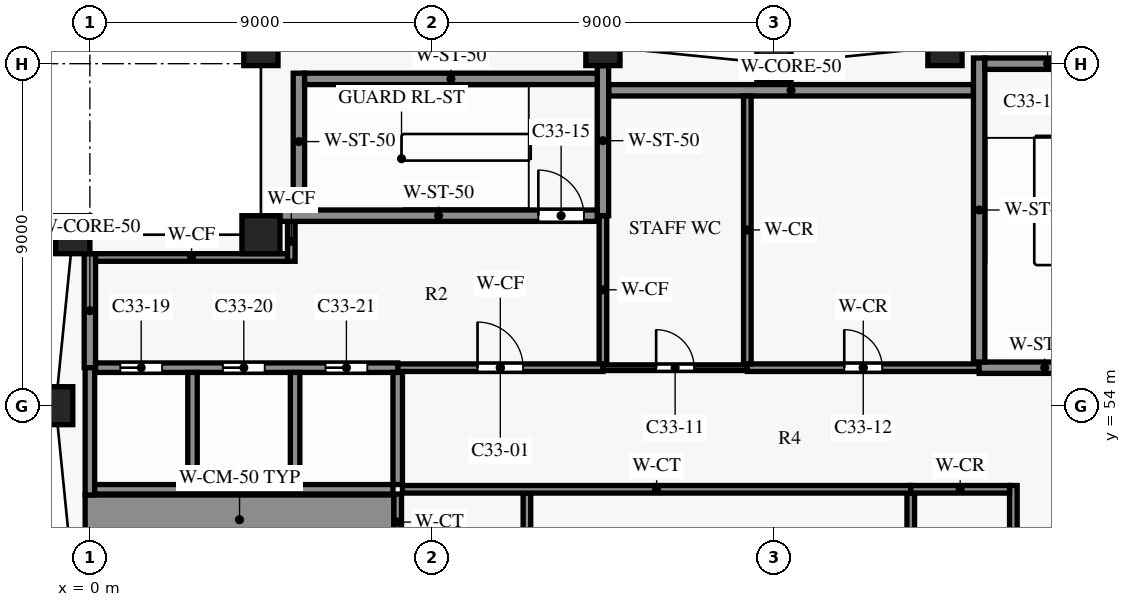
"""IFC4 building model, lengths in metres.
Left out: names, types, materials, properties, quantities, classifications, styles, units other than length and angle.
Written with IfcOpenShell. Run it as: python <this file> out.ifc"""

import sys

from ifc_helpers import new_model, si_unit, direction, frame, frame_2d, origin, origin_2d, place, context, subcontext, project, spatial, rectangle, extrude, element, fill, save


model = new_model("IFC4")
c1 = context("Model", 3, precision=1e-05, world=origin(), true_north=direction((0.0, 1.0)))
c2 = subcontext(c1, "Body", "Model", "MODEL_VIEW")
j1 = project(units=[si_unit("LENGTHUNIT", "METRE"), si_unit("PLANEANGLEUNIT", "RADIAN")], contexts=[c1])
p1 = place(None, origin())
s1 = spatial("IfcSite", under=j1, at=p1, CompositionType="ELEMENT")
p2 = place(p1, origin())
s2 = spatial("IfcBuilding", under=s1, at=p2, CompositionType="ELEMENT")
p3 = place(p2, frame((0.0, 0.0, 248.2)))
s3 = spatial("IfcBuildingStorey", under=s2, at=p3, CompositionType="ELEMENT", Elevation=248.2)
for number, where, z_axis, x_axis in (
    (1, (22.5, 63.45, 0.0), (0.0, 0.0, 1.0), (-0.995, -0.1, 0.0)),
    (2, (18.0, 63.0, 0.0), (0.0, 0.0, 1.0), (-1.0, 0.0, 0.0)),
    (3, (13.5, 63.45, 0.0), (0.0, 0.0, 1.0), (-0.995, 0.1, 0.0)),
    (4, (4.5, 63.45, 0.0), (0.0, 0.0, 1.0), (-0.995, -0.1, 0.0)),
    (5, (-0.45, 58.5, 0.0), (0.0, 0.0, 1.0), (-0.1, -0.995, 0.0)),
    (6, (-0.9, 54.0, 0.0), (0.0, 0.0, 1.0), (0.0, -1.0, 0.0)),
):
    element("IfcColumn", number, at=place(p3, frame(where, z_axis=z_axis, x_axis=x_axis)), inside=s3, PredefinedType="COLUMN", context=c2, shape_type="SweptSolid", body=[
        extrude(rectangle(XDim=0.9, YDim=1.0, at=origin_2d()), origin(), (0.0, 0.0, 1.0), 4.2),
    ])
p4 = place(p3, frame((4.5, 58.5, 0.0), z_axis=(0.0, 0.0, 1.0), x_axis=(1.0, 0.0, 0.0)))
e7 = element("IfcColumn", 7, at=p4, inside=s3, PredefinedType="COLUMN", context=c2, shape_type="SweptSolid", body=[
    extrude(rectangle(XDim=1.0, YDim=1.0, at=origin_2d()), origin(), (0.0, 0.0, 1.0), 4.2),
])
p5 = place(p3, frame((-0.125, 51.0, 0.0), z_axis=(0.0, 0.0, 1.0), x_axis=(1.0, 0.0, 0.0)))
e8 = element("IfcWall", 8, at=p5, inside=s3, PredefinedType="SHEAR", context=c2, shape_type="SweptSolid", body=[
    extrude(rectangle(XDim=8.125, YDim=1.3, at=frame_2d((4.062, 0.0))), origin(), (0.0, 0.0, 1.0), 3.9),
])
p6 = place(p3, frame((8.225, 51.8, 0.0), z_axis=(0.0, 0.0, 1.0), x_axis=(1.0, 0.0, 0.0)))
e9 = element("IfcWall", 9, at=p6, inside=s3, PredefinedType="PARTITIONING", context=c2, shape_type="SweptSolid", body=[
    extrude(rectangle(XDim=13.375, YDim=0.2, at=frame_2d((6.688, 0.0))), origin(), (0.0, 0.0, 1.0), 3.9),
])
p7 = place(p3, frame((21.6, 51.8, 0.0), z_axis=(0.0, 0.0, 1.0), x_axis=(1.0, 0.0, 0.0)))
e10 = element("IfcWall", 10, at=p7, inside=s3, PredefinedType="PARTITIONING", context=c2, shape_type="SweptSolid", body=[
    extrude(rectangle(XDim=2.6, YDim=0.2, at=frame_2d((1.3, 0.0))), origin(), (0.0, 0.0, 1.0), 3.9),
])
p8 = place(p3, frame((0.125, 51.8, 0.0), z_axis=(0.0, 0.0, 1.0), x_axis=(1.0, 0.0, 0.0)))
e11 = element("IfcWall", 11, at=p8, inside=s3, PredefinedType="SHEAR", context=c2, shape_type="SweptSolid", body=[
    extrude(rectangle(XDim=7.85, YDim=0.25, at=frame_2d((3.925, 0.0))), origin(), (0.0, 0.0, 1.0), 3.9),
])
p9 = place(p3, frame((8.1, 55.0, 0.0), z_axis=(0.0, 0.0, 1.0), x_axis=(1.0, 0.0, 0.0)))
e12 = element("IfcWall", 12, at=p9, inside=s3, PredefinedType="PARTITIONING", context=c2, shape_type="SweptSolid", body=[
    extrude(rectangle(XDim=5.4, YDim=0.2, at=frame_2d((2.7, 0.0))), origin(), (0.0, 0.0, 1.0), 3.9),
])
p10 = place(p9, frame((2.1, 0.0, 0.0)))
e13 = element("IfcOpeningElement", 13, at=p10, cuts=e12, PredefinedType="OPENING", context=c2, shape_type="SweptSolid", body=[
    extrude(rectangle(XDim=1.2, YDim=2.2, at=frame_2d((0.6, 1.1))), frame((0.0, 0.11, 0.0), z_axis=(0.0, -1.0, 0.0), x_axis=(1.0, 0.0, 0.0)), (0.0, 0.0, 1.0), 0.22),
])
p11 = place(p3, frame((13.5, 55.0, 0.0), z_axis=(0.0, 0.0, 1.0), x_axis=(1.0, 0.0, 0.0)))
e14 = element("IfcWall", 14, at=p11, inside=s3, PredefinedType="PARTITIONING", context=c2, shape_type="SweptSolid", body=[
    extrude(rectangle(XDim=3.8, YDim=0.15, at=frame_2d((1.9, 0.0))), origin(), (0.0, 0.0, 1.0), 3.9),
])
p12 = place(p11, frame((1.4, 0.0, 0.0)))
e15 = element("IfcOpeningElement", 15, at=p12, cuts=e14, PredefinedType="OPENING", context=c2, shape_type="SweptSolid", body=[
    extrude(rectangle(XDim=1.0, YDim=2.1, at=frame_2d((0.5, 1.05))), frame((0.0, 0.085, 0.0), z_axis=(0.0, -1.0, 0.0), x_axis=(1.0, 0.0, 0.0)), (0.0, 0.0, 1.0), 0.17),
])
p13 = place(p3, frame((17.3, 55.0, 0.0), z_axis=(0.0, 0.0, 1.0), x_axis=(1.0, 0.0, 0.0)))
e16 = element("IfcWall", 16, at=p13, inside=s3, PredefinedType="PARTITIONING", context=c2, shape_type="SweptSolid", body=[
    extrude(rectangle(XDim=6.1, YDim=0.2, at=frame_2d((3.05, 0.0))), origin(), (0.0, 0.0, 1.0), 3.9),
])
p14 = place(p13, frame((2.55, 0.0, 0.0)))
e17 = element("IfcOpeningElement", 17, at=p14, cuts=e16, PredefinedType="OPENING", context=c2, shape_type="SweptSolid", body=[
    extrude(rectangle(XDim=1.0, YDim=2.1, at=frame_2d((0.5, 1.05))), frame((0.0, 0.11, 0.0), z_axis=(0.0, -1.0, 0.0), x_axis=(1.0, 0.0, 0.0)), (0.0, 0.0, 1.0), 0.22),
])
p15 = place(p3, frame((0.15, 55.0, 0.0), z_axis=(0.0, 0.0, 1.0), x_axis=(1.0, 0.0, 0.0)))
e18 = element("IfcWall", 18, at=p15, inside=s3, PredefinedType="SHEAR", context=c2, shape_type="SweptSolid", body=[
    extrude(rectangle(XDim=7.95, YDim=0.25, at=frame_2d((3.975, 0.0))), origin(), (0.0, 0.0, 1.0), 3.9),
])
p16 = place(p15, frame((0.65, 0.0, 0.0)))
e19 = element("IfcOpeningElement", 19, at=p16, cuts=e18, PredefinedType="OPENING", context=c2, shape_type="SweptSolid", body=[
    extrude(rectangle(XDim=1.1, YDim=2.1, at=frame_2d((0.55, 1.05))), frame((0.0, 0.135, 0.0), z_axis=(0.0, -1.0, 0.0), x_axis=(1.0, 0.0, 0.0)), (0.0, 0.0, 1.0), 0.27),
])
p17 = place(p15, frame((3.35, 0.0, 0.0)))
e20 = element("IfcOpeningElement", 20, at=p17, cuts=e18, PredefinedType="OPENING", context=c2, shape_type="SweptSolid", body=[
    extrude(rectangle(XDim=1.1, YDim=2.1, at=frame_2d((0.55, 1.05))), frame((0.0, 0.135, 0.0), z_axis=(0.0, -1.0, 0.0), x_axis=(1.0, 0.0, 0.0)), (0.0, 0.0, 1.0), 0.27),
])
p18 = place(p15, frame((6.05, 0.0, 0.0)))
e21 = element("IfcOpeningElement", 21, at=p18, cuts=e18, PredefinedType="OPENING", context=c2, shape_type="SweptSolid", body=[
    extrude(rectangle(XDim=1.1, YDim=2.1, at=frame_2d((0.55, 1.05))), frame((0.0, 0.135, 0.0), z_axis=(0.0, -1.0, 0.0), x_axis=(1.0, 0.0, 0.0)), (0.0, 0.0, 1.0), 0.27),
])
p19 = place(p3, frame((23.4, 55.0, 0.0), z_axis=(0.0, 0.0, 1.0), x_axis=(1.0, 0.0, 0.0)))
e22 = element("IfcWall", 22, at=p19, inside=s3, PredefinedType="SHEAR", context=c2, shape_type="SweptSolid", body=[
    extrude(rectangle(XDim=3.45, YDim=0.3, at=frame_2d((1.725, 0.0))), origin(), (0.0, 0.0, 1.0), 3.9),
])
p20 = place(p3, frame((0.15, 57.9, 0.0), z_axis=(0.0, 0.0, 1.0), x_axis=(1.0, 0.0, 0.0)))
e23 = element("IfcWall", 23, at=p20, inside=s3, PredefinedType="PARTITIONING", context=c2, shape_type="SweptSolid", body=[
    extrude(rectangle(XDim=5.05, YDim=0.2, at=frame_2d((2.525, 0.0))), origin(), (0.0, 0.0, 1.0), 3.9),
])
p21 = place(p3, frame((5.0, 59.0, 0.0), z_axis=(0.0, 0.0, 1.0), x_axis=(1.0, 0.0, 0.0)))
e24 = element("IfcWall", 24, at=p21, inside=s3, PredefinedType="SHEAR", context=c2, shape_type="SweptSolid", body=[
    extrude(rectangle(XDim=8.35, YDim=0.3, at=frame_2d((4.175, 0.0))), origin(), (0.0, 0.0, 1.0), 3.9),
])
p22 = place(p21, frame((6.8, 0.0, 0.0)))
e25 = element("IfcOpeningElement", 25, at=p22, cuts=e24, PredefinedType="OPENING", context=c2, shape_type="SweptSolid", body=[
    extrude(rectangle(XDim=1.2, YDim=2.2, at=frame_2d((0.6, 1.1))), frame((0.0, 0.16, 0.0), z_axis=(0.0, -1.0, 0.0), x_axis=(1.0, 0.0, 0.0)), (0.0, 0.0, 1.0), 0.32),
])
p23 = place(p3, frame((13.65, 62.3, 0.0), z_axis=(0.0, 0.0, 1.0), x_axis=(1.0, 0.0, 0.0)))
e26 = element("IfcWall", 26, at=p23, inside=s3, PredefinedType="SHEAR", context=c2, shape_type="SweptSolid", body=[
    extrude(rectangle(XDim=9.6, YDim=0.3, at=frame_2d((4.8, 0.0))), origin(), (0.0, 0.0, 1.0), 3.9),
])
p24 = place(p3, frame((5.65, 62.6, 0.0), z_axis=(0.0, 0.0, 1.0), x_axis=(1.0, 0.0, 0.0)))
e27 = element("IfcWall", 27, at=p24, inside=s3, PredefinedType="SHEAR", context=c2, shape_type="SweptSolid", body=[
    extrude(rectangle(XDim=7.7, YDim=0.3, at=frame_2d((3.85, 0.0))), origin(), (0.0, 0.0, 1.0), 3.9),
])
p25 = place(p3, frame((23.55, 63.0, 0.0), z_axis=(0.0, 0.0, 1.0), x_axis=(1.0, 0.0, 0.0)))
e28 = element("IfcWall", 28, at=p25, inside=s3, PredefinedType="SHEAR", context=c2, shape_type="SweptSolid", body=[
    extrude(rectangle(XDim=3.3, YDim=0.3, at=frame_2d((1.65, 0.0))), origin(), (0.0, 0.0, 1.0), 3.9),
])
p26 = place(p3, frame((0.0, 55.0, 0.0), z_axis=(0.0, 0.0, 1.0), x_axis=(0.0, 1.0, 0.0)))
e29 = element("IfcWall", 29, at=p26, inside=s3, PredefinedType="SHEAR", context=c2, shape_type="SweptSolid", body=[
    extrude(rectangle(XDim=3.0, YDim=0.3, at=frame_2d((1.5, 0.0))), origin(), (0.0, 0.0, 1.0), 3.9),
])
p27 = place(p3, frame((0.0, 51.65, 0.0), z_axis=(0.0, 0.0, 1.0), x_axis=(0.0, 1.0, 0.0)))
e30 = element("IfcWall", 30, at=p27, inside=s3, PredefinedType="SHEAR", context=c2, shape_type="SweptSolid", body=[
    extrude(rectangle(XDim=3.35, YDim=0.25, at=frame_2d((1.675, 0.0))), origin(), (0.0, 0.0, 1.0), 3.9),
])
p28 = place(p3, frame((2.7, 51.925, 0.0), z_axis=(0.0, 0.0, 1.0), x_axis=(0.0, 1.0, 0.0)))
e31 = element("IfcWall", 31, at=p28, inside=s3, PredefinedType="SHEAR", context=c2, shape_type="SweptSolid", body=[
    extrude(rectangle(XDim=2.95, YDim=0.25, at=frame_2d((1.475, 0.0))), origin(), (0.0, 0.0, 1.0), 3.9),
])
p29 = place(p3, frame((5.3, 57.8, 0.0), z_axis=(0.0, 0.0, 1.0), x_axis=(0.0, 1.0, 0.0)))
e32 = element("IfcWall", 32, at=p29, inside=s3, PredefinedType="PARTITIONING", context=c2, shape_type="SweptSolid", body=[
    extrude(rectangle(XDim=1.05, YDim=0.2, at=frame_2d((0.525, 0.0))), origin(), (0.0, 0.0, 1.0), 3.9),
])
p30 = place(p3, frame((5.4, 51.925, 0.0), z_axis=(0.0, 0.0, 1.0), x_axis=(0.0, 1.0, 0.0)))
e33 = element("IfcWall", 33, at=p30, inside=s3, PredefinedType="SHEAR", context=c2, shape_type="SweptSolid", body=[
    extrude(rectangle(XDim=2.95, YDim=0.25, at=frame_2d((1.475, 0.0))), origin(), (0.0, 0.0, 1.0), 3.9),
])
p31 = place(p3, frame((5.5, 59.15, 0.0), z_axis=(0.0, 0.0, 1.0), x_axis=(0.0, 1.0, 0.0)))
e34 = element("IfcWall", 34, at=p31, inside=s3, PredefinedType="SHEAR", context=c2, shape_type="SweptSolid", body=[
    extrude(rectangle(XDim=3.6, YDim=0.3, at=frame_2d((1.8, 0.0))), origin(), (0.0, 0.0, 1.0), 3.9),
])
p32 = place(p3, frame((8.1, 50.2, 0.0), z_axis=(0.0, 0.0, 1.0), x_axis=(0.0, 1.0, 0.0)))
e35 = element("IfcWall", 35, at=p32, inside=s3, PredefinedType="PARTITIONING", context=c2, shape_type="SweptSolid", body=[
    extrude(rectangle(XDim=1.475, YDim=0.2, at=frame_2d((0.738, 0.0))), origin(), (0.0, 0.0, 1.0), 3.9),
])
p33 = place(p3, frame((8.1, 51.925, 0.0), z_axis=(0.0, 0.0, 1.0), x_axis=(0.0, 1.0, 0.0)))
e36 = element("IfcWall", 36, at=p33, inside=s3, PredefinedType="SHEAR", context=c2, shape_type="SweptSolid", body=[
    extrude(rectangle(XDim=2.95, YDim=0.25, at=frame_2d((1.475, 0.0))), origin(), (0.0, 0.0, 1.0), 3.9),
])
p34 = place(p3, frame((11.5, 47.1, 0.0), z_axis=(0.0, 0.0, 1.0), x_axis=(0.0, 1.0, 0.0)))
e37 = element("IfcWall", 37, at=p34, inside=s3, PredefinedType="PARTITIONING", context=c2, shape_type="SweptSolid", body=[
    extrude(rectangle(XDim=4.6, YDim=0.2, at=frame_2d((2.3, 0.0))), origin(), (0.0, 0.0, 1.0), 3.9),
])
p35 = place(p3, frame((13.5, 55.1, 0.0), z_axis=(0.0, 0.0, 1.0), x_axis=(0.0, 1.0, 0.0)))
e38 = element("IfcWall", 38, at=p35, inside=s3, PredefinedType="PARTITIONING", context=c2, shape_type="SweptSolid", body=[
    extrude(rectangle(XDim=3.9, YDim=0.2, at=frame_2d((1.95, 0.0))), origin(), (0.0, 0.0, 1.0), 3.9),
])
p36 = place(p3, frame((13.5, 59.0, 0.0), z_axis=(0.0, 0.0, 1.0), x_axis=(0.0, 1.0, 0.0)))
e39 = element("IfcWall", 39, at=p36, inside=s3, PredefinedType="SHEAR", context=c2, shape_type="SweptSolid", body=[
    extrude(rectangle(XDim=3.948, YDim=0.3, at=frame_2d((1.974, 0.0))), origin(), (0.0, 0.0, 1.0), 3.9),
])
p37 = place(p3, frame((17.3, 55.1, 0.0), z_axis=(0.0, 0.0, 1.0), x_axis=(0.0, 1.0, 0.0)))
e40 = element("IfcWall", 40, at=p37, inside=s3, PredefinedType="PARTITIONING", context=c2, shape_type="SweptSolid", body=[
    extrude(rectangle(XDim=7.05, YDim=0.2, at=frame_2d((3.525, 0.0))), origin(), (0.0, 0.0, 1.0), 3.9),
])
p38 = place(p3, frame((21.6, 47.1, 0.0), z_axis=(0.0, 0.0, 1.0), x_axis=(0.0, 1.0, 0.0)))
e41 = element("IfcWall", 41, at=p38, inside=s3, PredefinedType="PARTITIONING", context=c2, shape_type="SweptSolid", body=[
    extrude(rectangle(XDim=4.6, YDim=0.2, at=frame_2d((2.3, 0.0))), origin(), (0.0, 0.0, 1.0), 3.9),
])
p39 = place(p3, frame((23.4, 55.15, 0.0), z_axis=(0.0, 0.0, 1.0), x_axis=(0.0, 1.0, 0.0)))
e42 = element("IfcWall", 42, at=p39, inside=s3, PredefinedType="SHEAR", context=c2, shape_type="SweptSolid", body=[
    extrude(rectangle(XDim=8.0, YDim=0.3, at=frame_2d((4.0, 0.0))), origin(), (0.0, 0.0, 1.0), 3.9),
])
p40 = place(p3, frame((24.3, 46.9, 0.0), z_axis=(0.0, 0.0, 1.0), x_axis=(0.0, 1.0, 0.0)))
e43 = element("IfcWall", 43, at=p40, inside=s3, PredefinedType="SHEAR", context=c2, shape_type="SweptSolid", body=[
    extrude(rectangle(XDim=5.0, YDim=0.2, at=frame_2d((2.5, 0.0))), origin(), (0.0, 0.0, 1.0), 3.9),
])
p41 = place(p10, origin())
e44 = element("IfcDoor", 44, at=p41, inside=s3, OperationType="SINGLE_SWING_RIGHT", PredefinedType="DOOR", context=c2, shape_type="SweptSolid", body=[
    extrude(rectangle(XDim=1.2, YDim=2.2, at=frame_2d((0.6, 1.1))), frame((0.0, 0.025, 0.0), z_axis=(0.0, -1.0, 0.0), x_axis=(1.0, 0.0, 0.0)), (0.0, 0.0, 1.0), 0.05),
])
fill(e13, e44)
p42 = place(p12, origin())
e45 = element("IfcDoor", 45, at=p42, inside=s3, OperationType="SINGLE_SWING_LEFT", PredefinedType="DOOR", context=c2, shape_type="SweptSolid", body=[
    extrude(rectangle(XDim=1.0, YDim=2.1, at=frame_2d((0.5, 1.05))), frame((0.0, 0.025, 0.0), z_axis=(0.0, -1.0, 0.0), x_axis=(1.0, 0.0, 0.0)), (0.0, 0.0, 1.0), 0.05),
])
fill(e15, e45)
p43 = place(p14, origin())
e46 = element("IfcDoor", 46, at=p43, inside=s3, OperationType="SINGLE_SWING_RIGHT", PredefinedType="DOOR", context=c2, shape_type="SweptSolid", body=[
    extrude(rectangle(XDim=1.0, YDim=2.1, at=frame_2d((0.5, 1.05))), frame((0.0, 0.025, 0.0), z_axis=(0.0, -1.0, 0.0), x_axis=(1.0, 0.0, 0.0)), (0.0, 0.0, 1.0), 0.05),
])
fill(e17, e46)
p44 = place(p22, origin())
e47 = element("IfcDoor", 47, at=p44, inside=s3, OperationType="SINGLE_SWING_RIGHT", PredefinedType="DOOR", context=c2, shape_type="SweptSolid", body=[
    extrude(rectangle(XDim=1.2, YDim=2.2, at=frame_2d((0.6, 1.1))), frame((0.0, 0.025, 0.0), z_axis=(0.0, -1.0, 0.0), x_axis=(1.0, 0.0, 0.0)), (0.0, 0.0, 1.0), 0.05),
])
fill(e25, e47)
p45 = place(p16, origin())
e48 = element("IfcDoor", 48, at=p45, inside=s3, OperationType="DOUBLE_DOOR_SLIDING", PredefinedType="DOOR", context=c2, shape_type="SweptSolid", body=[
    extrude(rectangle(XDim=1.1, YDim=2.1, at=frame_2d((0.55, 1.05))), frame((0.0, 0.025, 0.0), z_axis=(0.0, -1.0, 0.0), x_axis=(1.0, 0.0, 0.0)), (0.0, 0.0, 1.0), 0.05),
])
fill(e19, e48)
p46 = place(p17, origin())
e49 = element("IfcDoor", 49, at=p46, inside=s3, OperationType="DOUBLE_DOOR_SLIDING", PredefinedType="DOOR", context=c2, shape_type="SweptSolid", body=[
    extrude(rectangle(XDim=1.1, YDim=2.1, at=frame_2d((0.55, 1.05))), frame((0.0, 0.025, 0.0), z_axis=(0.0, -1.0, 0.0), x_axis=(1.0, 0.0, 0.0)), (0.0, 0.0, 1.0), 0.05),
])
fill(e20, e49)
p47 = place(p18, origin())
e50 = element("IfcDoor", 50, at=p47, inside=s3, OperationType="DOUBLE_DOOR_SLIDING", PredefinedType="DOOR", context=c2, shape_type="SweptSolid", body=[
    extrude(rectangle(XDim=1.1, YDim=2.1, at=frame_2d((0.55, 1.05))), frame((0.0, 0.025, 0.0), z_axis=(0.0, -1.0, 0.0), x_axis=(1.0, 0.0, 0.0)), (0.0, 0.0, 1.0), 0.05),
])
fill(e21, e50)
save(model, sys.argv[1])
